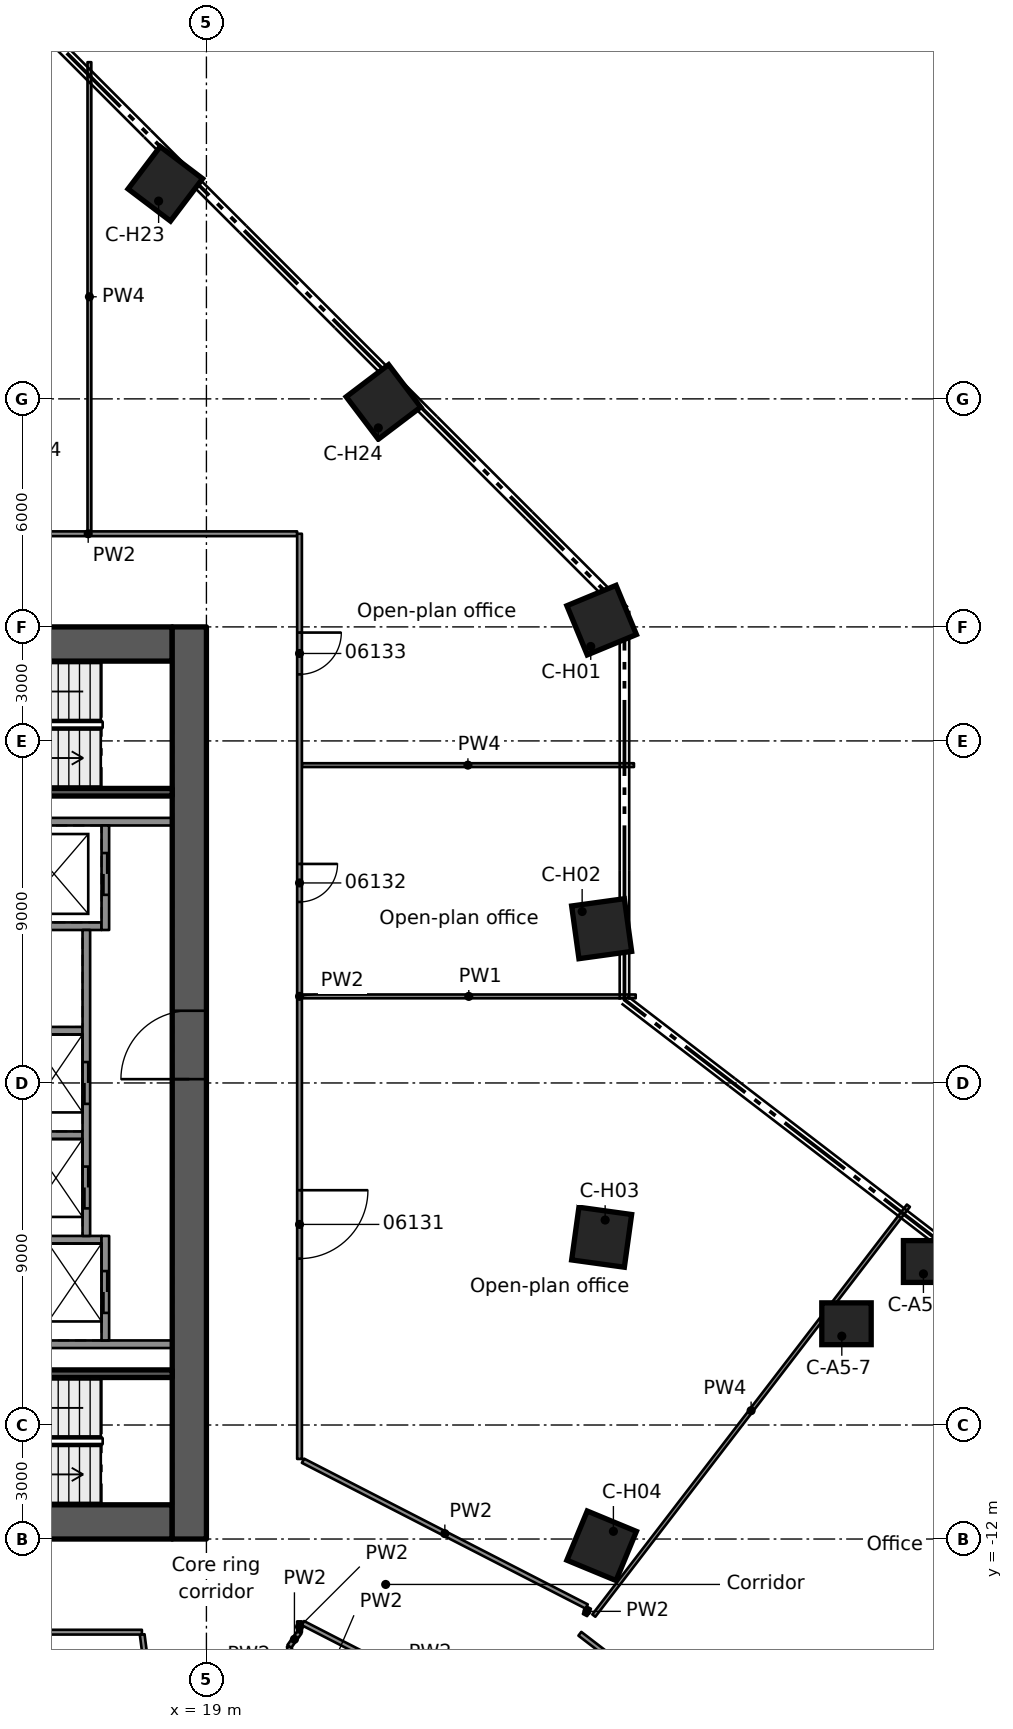
"""IFC4 building model, lengths in metres.
Left out: names, types, materials, properties, quantities, classifications, styles, units other than length and angle.
Written with IfcOpenShell. Run it as: python <this file> out.ifc"""

import sys

from ifc_helpers import new_model, si_unit, direction, frame, frame_2d, origin, origin_2d, place, context, subcontext, project, spatial, rectangle, extrude, element, fill, save


model = new_model("IFC4")
c1 = context("Model", 3, precision=1e-05, world=origin(), true_north=direction((0.0, 1.0)))
c2 = subcontext(c1, "Body", "Model", "MODEL_VIEW")
j1 = project(units=[si_unit("LENGTHUNIT", "METRE"), si_unit("PLANEANGLEUNIT", "RADIAN")], contexts=[c1])
p1 = place(None, origin())
s1 = spatial("IfcSite", under=j1, at=p1, CompositionType="ELEMENT")
p2 = place(p1, origin())
s2 = spatial("IfcBuilding", under=s1, at=p2, CompositionType="ELEMENT")
p3 = place(p2, frame((0.0, 0.0, 29.2)))
s3 = spatial("IfcBuildingStorey", under=s2, at=p3, CompositionType="ELEMENT", Elevation=29.2)
p4 = place(p3, frame((8.9, 11.55, 0.0), z_axis=(0.0, 0.0, 1.0), x_axis=(1.0, 0.0, 0.0)))
e1 = element("IfcWall", 1, at=p4, inside=s3, PredefinedType="SHEAR", context=c2, shape_type="SweptSolid", body=[
    extrude(rectangle(XDim=9.2, YDim=0.9, at=frame_2d((4.6, 0.0))), origin(), (0.0, 0.0, 1.0), 4.1),
])
p5 = place(p4, frame((3.0, 0.0, 0.0)))
e2 = element("IfcOpeningElement", 2, at=p5, cuts=e1, PredefinedType="OPENING", context=c2, shape_type="SweptSolid", body=[
    extrude(rectangle(XDim=1.1, YDim=2.1, at=frame_2d((0.55, 1.05))), frame((0.0, 0.46, 0.0), z_axis=(0.0, -1.0, 0.0), x_axis=(1.0, 0.0, 0.0)), (0.0, 0.0, 1.0), 0.92),
])
p6 = place(p4, frame((0.77, 0.0, 0.0)))
e3 = element("IfcOpeningElement", 3, at=p6, cuts=e1, PredefinedType="OPENING", context=c2, shape_type="SweptSolid", body=[
    extrude(rectangle(XDim=0.9, YDim=2.1, at=frame_2d((0.45, 1.05))), frame((0.0, 0.46, 0.0), z_axis=(0.0, -1.0, 0.0), x_axis=(1.0, 0.0, 0.0)), (0.0, 0.0, 1.0), 0.92),
])
p7 = place(p3, frame((8.9, -11.55, 0.0), z_axis=(0.0, 0.0, 1.0), x_axis=(1.0, 0.0, 0.0)))
e4 = element("IfcWall", 4, at=p7, inside=s3, PredefinedType="SHEAR", context=c2, shape_type="SweptSolid", body=[
    extrude(rectangle(XDim=9.2, YDim=0.9, at=frame_2d((4.6, 0.0))), origin(), (0.0, 0.0, 1.0), 4.1),
])
p8 = place(p7, frame((3.0, 0.0, 0.0)))
e5 = element("IfcOpeningElement", 5, at=p8, cuts=e4, PredefinedType="OPENING", context=c2, shape_type="SweptSolid", body=[
    extrude(rectangle(XDim=1.1, YDim=2.1, at=frame_2d((0.55, 1.05))), frame((0.0, 0.46, 0.0), z_axis=(0.0, -1.0, 0.0), x_axis=(1.0, 0.0, 0.0)), (0.0, 0.0, 1.0), 0.92),
])
p9 = place(p3, frame((18.55, -12.0, 0.0), z_axis=(0.0, 0.0, 1.0), x_axis=(0.0, 1.0, 0.0)))
e6 = element("IfcWall", 6, at=p9, inside=s3, PredefinedType="SHEAR", context=c2, shape_type="SweptSolid", body=[
    extrude(rectangle(XDim=24.0, YDim=0.9, at=frame_2d((12.0, 0.0))), origin(), (0.0, 0.0, 1.0), 4.1),
])
p10 = place(p9, frame((12.1, 0.0, 0.0)))
e7 = element("IfcOpeningElement", 7, at=p10, cuts=e6, PredefinedType="OPENING", context=c2, shape_type="SweptSolid", body=[
    extrude(rectangle(XDim=1.8, YDim=2.1, at=frame_2d((0.9, 1.05))), frame((0.0, 0.46, 0.0), z_axis=(0.0, -1.0, 0.0), x_axis=(1.0, 0.0, 0.0)), (0.0, 0.0, 1.0), 0.92),
])
for number, where, z_axis, x_axis in (
    (8, (37.991, -4.698, 0.0), (0.0, 0.0, 1.0), (1.0, 0.0, 0.0)),
    (9, (35.843, -6.336, 0.0), (0.0, 0.0, 1.0), (1.0, 0.0, 0.0)),
):
    element("IfcColumn", number, at=place(p3, frame(where, z_axis=z_axis, x_axis=x_axis)), inside=s3, PredefinedType="COLUMN", context=c2, shape_type="SweptSolid", body=[
        extrude(rectangle(XDim=1.3, YDim=1.1, at=origin_2d()), origin(), (0.0, 0.0, 1.0), 4.1),
    ])
for number, where, z_axis, x_axis in (
    (10, (29.4, 12.178, 0.0), (0.0, 0.0, 1.0), (0.924, 0.383, 0.0)),
    (11, (29.4, 4.059, 0.0), (0.0, 0.0, 1.0), (0.991, 0.137, 0.0)),
    (12, (29.4, -4.059, 0.0), (0.0, 0.0, 1.0), (0.991, -0.137, 0.0)),
    (13, (29.4, -12.178, 0.0), (0.0, 0.0, 1.0), (0.924, -0.383, 0.0)),
    (14, (17.919, 23.659, 0.0), (0.0, 0.0, 1.0), (0.604, 0.797, 0.0)),
    (15, (23.659, 17.919, 0.0), (0.0, 0.0, 1.0), (0.797, 0.604, 0.0)),
):
    element("IfcColumn", number, at=place(p3, frame(where, z_axis=z_axis, x_axis=x_axis)), inside=s3, PredefinedType="COLUMN", context=c2, shape_type="SweptSolid", body=[
        extrude(rectangle(XDim=1.4, YDim=1.4, at=origin_2d()), origin(), (0.0, 0.0, 1.0), 4.1),
    ])
for number, where, z_axis, x_axis in (
    (16, (11.54, -6.875, 0.0), (0.0, 0.0, 1.0), (1.0, 0.0, 0.0)),
    (17, (11.54, 6.875, 0.0), (0.0, 0.0, 1.0), (1.0, 0.0, 0.0)),
):
    element("IfcWall", number, at=place(p3, frame(where, z_axis=z_axis, x_axis=x_axis)), inside=s3, PredefinedType="SOLIDWALL", context=c2, shape_type="SweptSolid", body=[
        extrude(rectangle(XDim=6.56, YDim=0.2, at=frame_2d((3.28, 0.0))), origin(), (0.0, 0.0, 1.0), 3.68),
    ])
p11 = place(p3, frame((11.54, 4.125, 0.0), z_axis=(0.0, 0.0, 1.0), x_axis=(1.0, 0.0, 0.0)))
e18 = element("IfcWall", 18, at=p11, inside=s3, PredefinedType="SOLIDWALL", context=c2, shape_type="SweptSolid", body=[
    extrude(rectangle(XDim=4.7, YDim=0.2, at=frame_2d((2.35, 0.0))), origin(), (0.0, 0.0, 1.0), 3.68),
])
for number, where, z_axis, x_axis in (
    (19, (11.54, 1.375, 0.0), (0.0, 0.0, 1.0), (1.0, 0.0, 0.0)),
    (20, (11.54, -1.375, 0.0), (0.0, 0.0, 1.0), (1.0, 0.0, 0.0)),
):
    element("IfcWall", number, at=place(p3, frame(where, z_axis=z_axis, x_axis=x_axis)), inside=s3, PredefinedType="SOLIDWALL", context=c2, shape_type="SweptSolid", body=[
        extrude(rectangle(XDim=4.2, YDim=0.2, at=frame_2d((2.1, 0.0))), origin(), (0.0, 0.0, 1.0), 3.68),
    ])
p12 = place(p3, frame((11.54, -4.125, 0.0), z_axis=(0.0, 0.0, 1.0), x_axis=(1.0, 0.0, 0.0)))
e21 = element("IfcWall", 21, at=p12, inside=s3, PredefinedType="SOLIDWALL", context=c2, shape_type="SweptSolid", body=[
    extrude(rectangle(XDim=4.7, YDim=0.2, at=frame_2d((2.35, 0.0))), origin(), (0.0, 0.0, 1.0), 3.68),
])
p13 = place(p3, frame((16.34, 6.775, 0.0), z_axis=(0.0, 0.0, 1.0), x_axis=(0.0, -1.0, 0.0)))
e22 = element("IfcWall", 22, at=p13, inside=s3, PredefinedType="SOLIDWALL", context=c2, shape_type="SweptSolid", body=[
    extrude(rectangle(XDim=2.75, YDim=0.2, at=frame_2d((1.375, 0.0))), origin(), (0.0, 0.0, 1.0), 3.68),
])
p14 = place(p13, frame((0.725, 0.0, 0.0)))
e23 = element("IfcOpeningElement", 23, at=p14, cuts=e22, PredefinedType="OPENING", context=c2, shape_type="SweptSolid", body=[
    extrude(rectangle(XDim=1.1, YDim=2.1, at=frame_2d((0.55, 1.05))), frame((0.0, 0.11, 0.0), z_axis=(0.0, -1.0, 0.0), x_axis=(1.0, 0.0, 0.0)), (0.0, 0.0, 1.0), 0.22),
])
p15 = place(p3, frame((15.84, 4.025, 0.0), z_axis=(0.0, 0.0, 1.0), x_axis=(0.0, -1.0, 0.0)))
e24 = element("IfcWall", 24, at=p15, inside=s3, PredefinedType="SOLIDWALL", context=c2, shape_type="SweptSolid", body=[
    extrude(rectangle(XDim=8.05, YDim=0.2, at=frame_2d((4.025, 0.0))), origin(), (0.0, 0.0, 1.0), 3.68),
])
p16 = place(p15, frame((3.475, 0.0, 0.0)))
e25 = element("IfcOpeningElement", 25, at=p16, cuts=e24, PredefinedType="OPENING", context=c2, shape_type="SweptSolid", body=[
    extrude(rectangle(XDim=1.1, YDim=2.1, at=frame_2d((0.55, 1.05))), frame((0.0, 0.11, 0.0), z_axis=(0.0, -1.0, 0.0), x_axis=(1.0, 0.0, 0.0)), (0.0, 0.0, 1.0), 0.22),
])
p17 = place(p15, frame((6.225, 0.0, 0.0)))
e26 = element("IfcOpeningElement", 26, at=p17, cuts=e24, PredefinedType="OPENING", context=c2, shape_type="SweptSolid", body=[
    extrude(rectangle(XDim=1.1, YDim=2.1, at=frame_2d((0.55, 1.05))), frame((0.0, 0.11, 0.0), z_axis=(0.0, -1.0, 0.0), x_axis=(1.0, 0.0, 0.0)), (0.0, 0.0, 1.0), 0.22),
])
p18 = place(p3, frame((16.34, -4.025, 0.0), z_axis=(0.0, 0.0, 1.0), x_axis=(0.0, -1.0, 0.0)))
e27 = element("IfcWall", 27, at=p18, inside=s3, PredefinedType="SOLIDWALL", context=c2, shape_type="SweptSolid", body=[
    extrude(rectangle(XDim=2.75, YDim=0.2, at=frame_2d((1.375, 0.0))), origin(), (0.0, 0.0, 1.0), 3.68),
])
p19 = place(p18, frame((0.925, 0.0, 0.0)))
e28 = element("IfcOpeningElement", 28, at=p19, cuts=e27, PredefinedType="OPENING", context=c2, shape_type="SweptSolid", body=[
    extrude(rectangle(XDim=1.1, YDim=2.1, at=frame_2d((0.55, 1.05))), frame((0.0, 0.11, 0.0), z_axis=(0.0, -1.0, 0.0), x_axis=(1.0, 0.0, 0.0)), (0.0, 0.0, 1.0), 0.22),
])
for number, where, z_axis, x_axis in (
    (29, (11.54, -7.65, 0.0), (0.0, 0.0, 1.0), (1.0, 0.0, 0.0)),
    (30, (11.54, 7.65, 0.0), (0.0, 0.0, 1.0), (1.0, 0.0, 0.0)),
):
    element("IfcWall", number, at=place(p3, frame(where, z_axis=z_axis, x_axis=x_axis)), inside=s3, PredefinedType="SOLIDWALL", context=c2, shape_type="SweptSolid", body=[
        extrude(rectangle(XDim=6.56, YDim=0.2, at=frame_2d((3.28, 0.0))), origin(), (0.0, 0.0, 1.0), 3.68),
    ])
p20 = place(p3, frame((17.871, -18.861, 0.0), z_axis=(0.0, 0.0, 1.0), x_axis=(-0.127967803782, 0.991778322608, 0.0)))
e31 = element("IfcWall", 31, at=p20, inside=s3, PredefinedType="PARTITIONING", context=c2, shape_type="SweptSolid", body=[
    extrude(rectangle(XDim=4.384, YDim=0.125, at=frame_2d((2.192, 0.0))), origin(), (0.0, 0.0, 1.0), 3.66),
])
p21 = place(p20, frame((2.212, 0.0, 0.0)))
e32 = element("IfcOpeningElement", 32, at=p21, cuts=e31, PredefinedType="OPENING", context=c2, shape_type="SweptSolid", body=[
    extrude(rectangle(XDim=0.9, YDim=2.1, at=frame_2d((0.45, 1.05))), frame((0.0, 0.073, 0.0), z_axis=(0.0, -1.0, 0.0), x_axis=(1.0, 0.0, 0.0)), (0.0, 0.0, 1.0), 0.145),
])
p22 = place(p3, frame((21.182, -14.826, 0.0), z_axis=(0.0, 0.0, 1.0), x_axis=(0.128335992274, -0.991730746265, 0.0)))
e33 = element("IfcWall", 33, at=p22, inside=s3, PredefinedType="PARTITIONING", context=c2, shape_type="SweptSolid", body=[
    extrude(rectangle(XDim=2.549, YDim=0.125, at=frame_2d((1.274, 0.0))), origin(), (0.0, 0.0, 1.0), 3.66),
])
p23 = place(p3, frame((28.827, -14.493, 0.0), z_axis=(0.0, 0.0, 1.0), x_axis=(0.793315591759, -0.608810620695, 0.0)))
e34 = element("IfcWall", 34, at=p23, inside=s3, PredefinedType="PARTITIONING", context=c2, shape_type="SweptSolid", body=[
    extrude(rectangle(XDim=24.509, YDim=0.125, at=frame_2d((12.254, 0.0))), origin(), (0.0, 0.0, 1.0), 3.66),
])
p24 = place(p23, frame((4.6, 0.0, 0.0)))
e35 = element("IfcOpeningElement", 35, at=p24, cuts=e34, PredefinedType="OPENING", context=c2, shape_type="SweptSolid", body=[
    extrude(rectangle(XDim=0.9, YDim=2.1, at=frame_2d((0.45, 1.05))), frame((0.0, 0.073, 0.0), z_axis=(0.0, -1.0, 0.0), x_axis=(1.0, 0.0, 0.0)), (0.0, 0.0, 1.0), 0.145),
])
p25 = place(p23, frame((14.407, 0.0, 0.0)))
e36 = element("IfcOpeningElement", 36, at=p25, cuts=e34, PredefinedType="OPENING", context=c2, shape_type="SweptSolid", body=[
    extrude(rectangle(XDim=0.9, YDim=2.1, at=frame_2d((0.45, 1.05))), frame((0.0, 0.073, 0.0), z_axis=(0.0, -1.0, 0.0), x_axis=(1.0, 0.0, 0.0)), (0.0, 0.0, 1.0), 0.145),
])
p26 = place(p3, frame((21.541, -14.214, 0.0), z_axis=(0.0, 0.0, 1.0), x_axis=(0.889437525622, -0.457056766732, 0.0)))
e37 = element("IfcWall", 37, at=p26, inside=s3, PredefinedType="PARTITIONING", context=c2, shape_type="SweptSolid", body=[
    extrude(rectangle(XDim=5.986, YDim=0.125, at=frame_2d((2.993, 0.0))), origin(), (0.0, 0.0, 1.0), 3.66),
])
p27 = place(p3, frame((21.541, -9.94, 0.0), z_axis=(0.0, 0.0, 1.0), x_axis=(0.889469569246, -0.456994404107, 0.0)))
e38 = element("IfcWall", 38, at=p27, inside=s3, PredefinedType="PARTITIONING", context=c2, shape_type="SweptSolid", body=[
    extrude(rectangle(XDim=8.394, YDim=0.125, at=frame_2d((4.197, 0.0))), origin(), (0.0, 0.0, 1.0), 3.66),
])
p28 = place(p3, frame((10.391, -14.451, 0.0), z_axis=(0.0, 0.0, 1.0), x_axis=(1.0, 0.0, 0.0)))
e39 = element("IfcWall", 39, at=p28, inside=s3, PredefinedType="PARTITIONING", context=c2, shape_type="SweptSolid", body=[
    extrude(rectangle(XDim=6.911, YDim=0.125, at=frame_2d((3.456, 0.0))), origin(), (0.0, 0.0, 1.0), 3.66),
])
p29 = place(p3, frame((21.182, -14.826, 0.0), z_axis=(0.0, 0.0, 1.0), x_axis=(0.581538757464, 0.813518698966, 0.0)))
e40 = element("IfcWall", 40, at=p29, inside=s3, PredefinedType="PARTITIONING", context=c2, shape_type="SweptSolid", body=[
    extrude(rectangle(XDim=0.461, YDim=0.125, at=frame_2d((0.23, 0.0))), origin(), (0.0, 0.0, 1.0), 3.66),
])
p30 = place(p3, frame((21.512, 2.278, 0.0), z_axis=(0.0, 0.0, 1.0), x_axis=(1.0, 0.0, 0.0)))
e41 = element("IfcWall", 41, at=p30, inside=s3, PredefinedType="PARTITIONING", context=c2, shape_type="SweptSolid", body=[
    extrude(rectangle(XDim=8.784, YDim=0.1, at=frame_2d((4.392, 0.0))), origin(), (0.0, 0.0, 1.0), 3.66),
])
p31 = place(p3, frame((21.512, 8.363, 0.0), z_axis=(0.0, 0.0, 1.0), x_axis=(1.0, 0.0, 0.0)))
e42 = element("IfcWall", 42, at=p31, inside=s3, PredefinedType="PARTITIONING", context=c2, shape_type="SweptSolid", body=[
    extrude(rectangle(XDim=8.738, YDim=0.1, at=frame_2d((4.369, 0.0))), origin(), (0.0, 0.0, 1.0), 3.025),
])
p32 = place(p3, frame((10.391, 14.451, 0.0), z_axis=(0.0, 0.0, 1.0), x_axis=(1.0, 0.0, 0.0)))
e43 = element("IfcWall", 43, at=p32, inside=s3, PredefinedType="PARTITIONING", context=c2, shape_type="SweptSolid", body=[
    extrude(rectangle(XDim=10.996, YDim=0.125, at=frame_2d((5.498, 0.0))), origin(), (0.0, 0.0, 1.0), 3.66),
])
p33 = place(p32, frame((1.85, 0.0, 0.0)))
e44 = element("IfcOpeningElement", 44, at=p33, cuts=e43, PredefinedType="OPENING", context=c2, shape_type="SweptSolid", body=[
    extrude(rectangle(XDim=1.8, YDim=2.1, at=frame_2d((0.9, 1.05))), frame((0.0, 0.073, 0.0), z_axis=(0.0, -1.0, 0.0), x_axis=(1.0, 0.0, 0.0)), (0.0, 0.0, 1.0), 0.145),
])
p34 = place(p3, frame((37.042, -20.718, 0.0), z_axis=(0.0, 0.0, 1.0), x_axis=(0.608775561638, 0.793342495743, 0.0)))
e45 = element("IfcWall", 45, at=p34, inside=s3, PredefinedType="PARTITIONING", context=c2, shape_type="SweptSolid", body=[
    extrude(rectangle(XDim=14.136, YDim=0.1, at=frame_2d((7.068, 0.0))), origin(), (0.0, 0.0, 1.0), 3.025),
])
p35 = place(p3, frame((29.194, -14.015, 0.0), z_axis=(0.0, 0.0, 1.0), x_axis=(0.608832188233, 0.793299039815, 0.0)))
e46 = element("IfcWall", 46, at=p35, inside=s3, PredefinedType="PARTITIONING", context=c2, shape_type="SweptSolid", body=[
    extrude(rectangle(XDim=13.596, YDim=0.1, at=frame_2d((6.798, 0.0))), origin(), (0.0, 0.0, 1.0), 3.025),
])
p36 = place(p3, frame((28.962, -14.0, 0.0), z_axis=(0.0, 0.0, 1.0), x_axis=(0.458358127557, 0.8887675888, 0.0)))
e47 = element("IfcWall", 47, at=p36, inside=s3, PredefinedType="PARTITIONING", context=c2, shape_type="SweptSolid", body=[
    extrude(rectangle(XDim=0.218, YDim=0.125, at=frame_2d((0.109, 0.0))), origin(), (0.0, 0.0, 1.0), 3.66),
])
p37 = place(p3, frame((21.45, -14.451, 0.0), z_axis=(0.0, 0.0, 1.0), x_axis=(0.0, 1.0, 0.0)))
e48 = element("IfcWall", 48, at=p37, inside=s3, PredefinedType="PARTITIONING", context=c2, shape_type="SweptSolid", body=[
    extrude(rectangle(XDim=0.284, YDim=0.125, at=frame_2d((0.142, 0.0))), origin(), (0.0, 0.0, 1.0), 3.66),
])
p38 = place(p3, frame((21.45, 14.451, 0.0), z_axis=(0.0, 0.0, 1.0), x_axis=(0.0, -1.0, 0.0)))
e49 = element("IfcWall", 49, at=p38, inside=s3, PredefinedType="PARTITIONING", context=c2, shape_type="SweptSolid", body=[
    extrude(rectangle(XDim=24.344, YDim=0.125, at=frame_2d((12.172, 0.0))), origin(), (0.0, 0.0, 1.0), 3.66),
])
p39 = place(p38, frame((17.273, 0.0, 0.0)))
e50 = element("IfcOpeningElement", 50, at=p39, cuts=e49, PredefinedType="OPENING", context=c2, shape_type="SweptSolid", body=[
    extrude(rectangle(XDim=1.8, YDim=2.1, at=frame_2d((0.9, 1.05))), frame((0.0, 0.073, 0.0), z_axis=(0.0, -1.0, 0.0), x_axis=(1.0, 0.0, 0.0)), (0.0, 0.0, 1.0), 0.145),
])
p40 = place(p38, frame((8.688, 0.0, 0.0)))
e51 = element("IfcOpeningElement", 51, at=p40, cuts=e49, PredefinedType="OPENING", context=c2, shape_type="SweptSolid", body=[
    extrude(rectangle(XDim=1.0, YDim=2.1, at=frame_2d((0.5, 1.05))), frame((0.0, 0.073, 0.0), z_axis=(0.0, -1.0, 0.0), x_axis=(1.0, 0.0, 0.0)), (0.0, 0.0, 1.0), 0.145),
])
p41 = place(p38, frame((2.6, 0.0, 0.0)))
e52 = element("IfcOpeningElement", 52, at=p41, cuts=e49, PredefinedType="OPENING", context=c2, shape_type="SweptSolid", body=[
    extrude(rectangle(XDim=1.1, YDim=2.1, at=frame_2d((0.55, 1.05))), frame((0.0, 0.073, 0.0), z_axis=(0.0, -1.0, 0.0), x_axis=(1.0, 0.0, 0.0)), (0.0, 0.0, 1.0), 0.145),
])
p42 = place(p3, frame((15.921, 14.514, 0.0), z_axis=(0.0, 0.0, 1.0), x_axis=(0.0, 1.0, 0.0)))
e53 = element("IfcWall", 53, at=p42, inside=s3, PredefinedType="PARTITIONING", context=c2, shape_type="SweptSolid", body=[
    extrude(rectangle(XDim=12.345, YDim=0.1, at=frame_2d((6.172, 0.0))), origin(), (0.0, 0.0, 1.0), 3.025),
])
p43 = place(p14, origin())
e54 = element("IfcDoor", 54, at=p43, inside=s3, OperationType="DOUBLE_DOOR_SLIDING", PredefinedType="DOOR", context=c2, shape_type="SweptSolid", body=[
    extrude(rectangle(XDim=1.1, YDim=2.1, at=frame_2d((0.55, 1.05))), frame((0.0, 0.025, 0.0), z_axis=(0.0, -1.0, 0.0), x_axis=(1.0, 0.0, 0.0)), (0.0, 0.0, 1.0), 0.05),
])
fill(e23, e54)
p44 = place(p16, origin())
e55 = element("IfcDoor", 55, at=p44, inside=s3, OperationType="DOUBLE_DOOR_SLIDING", PredefinedType="DOOR", context=c2, shape_type="SweptSolid", body=[
    extrude(rectangle(XDim=1.1, YDim=2.1, at=frame_2d((0.55, 1.05))), frame((0.0, 0.025, 0.0), z_axis=(0.0, -1.0, 0.0), x_axis=(1.0, 0.0, 0.0)), (0.0, 0.0, 1.0), 0.05),
])
fill(e25, e55)
p45 = place(p17, origin())
e56 = element("IfcDoor", 56, at=p45, inside=s3, OperationType="DOUBLE_DOOR_SLIDING", PredefinedType="DOOR", context=c2, shape_type="SweptSolid", body=[
    extrude(rectangle(XDim=1.1, YDim=2.1, at=frame_2d((0.55, 1.05))), frame((0.0, 0.025, 0.0), z_axis=(0.0, -1.0, 0.0), x_axis=(1.0, 0.0, 0.0)), (0.0, 0.0, 1.0), 0.05),
])
fill(e26, e56)
p46 = place(p19, origin())
e57 = element("IfcDoor", 57, at=p46, inside=s3, OperationType="DOUBLE_DOOR_SLIDING", PredefinedType="DOOR", context=c2, shape_type="SweptSolid", body=[
    extrude(rectangle(XDim=1.1, YDim=2.1, at=frame_2d((0.55, 1.05))), frame((0.0, 0.025, 0.0), z_axis=(0.0, -1.0, 0.0), x_axis=(1.0, 0.0, 0.0)), (0.0, 0.0, 1.0), 0.05),
])
fill(e28, e57)
p47 = place(p10, origin())
e58 = element("IfcDoor", 58, at=p47, inside=s3, OperationType="SINGLE_SWING_RIGHT", PredefinedType="DOOR", context=c2, shape_type="SweptSolid", body=[
    extrude(rectangle(XDim=1.8, YDim=2.1, at=frame_2d((0.9, 1.05))), frame((0.0, 0.025, 0.0), z_axis=(0.0, -1.0, 0.0), x_axis=(1.0, 0.0, 0.0)), (0.0, 0.0, 1.0), 0.05),
])
fill(e7, e58)
p48 = place(p39, origin())
e59 = element("IfcDoor", 59, at=p48, inside=s3, OperationType="DOUBLE_DOOR_SINGLE_SWING", PredefinedType="DOOR", context=c2, shape_type="SweptSolid", body=[
    extrude(rectangle(XDim=1.8, YDim=2.1, at=frame_2d((0.9, 1.05))), frame((0.0, 0.025, 0.0), z_axis=(0.0, -1.0, 0.0), x_axis=(1.0, 0.0, 0.0)), (0.0, 0.0, 1.0), 0.05),
])
fill(e50, e59)
p49 = place(p40, origin())
e60 = element("IfcDoor", 60, at=p49, inside=s3, OperationType="SINGLE_SWING_LEFT", PredefinedType="DOOR", context=c2, shape_type="SweptSolid", body=[
    extrude(rectangle(XDim=1.0, YDim=2.1, at=frame_2d((0.5, 1.05))), frame((0.0, 0.025, 0.0), z_axis=(0.0, -1.0, 0.0), x_axis=(1.0, 0.0, 0.0)), (0.0, 0.0, 1.0), 0.05),
])
fill(e51, e60)
p50 = place(p41, origin())
e61 = element("IfcDoor", 61, at=p50, inside=s3, OperationType="SINGLE_SWING_LEFT", PredefinedType="DOOR", context=c2, shape_type="SweptSolid", body=[
    extrude(rectangle(XDim=1.1, YDim=2.1, at=frame_2d((0.55, 1.05))), frame((0.0, 0.025, 0.0), z_axis=(0.0, -1.0, 0.0), x_axis=(1.0, 0.0, 0.0)), (0.0, 0.0, 1.0), 0.05),
])
fill(e52, e61)
save(model, sys.argv[1])
